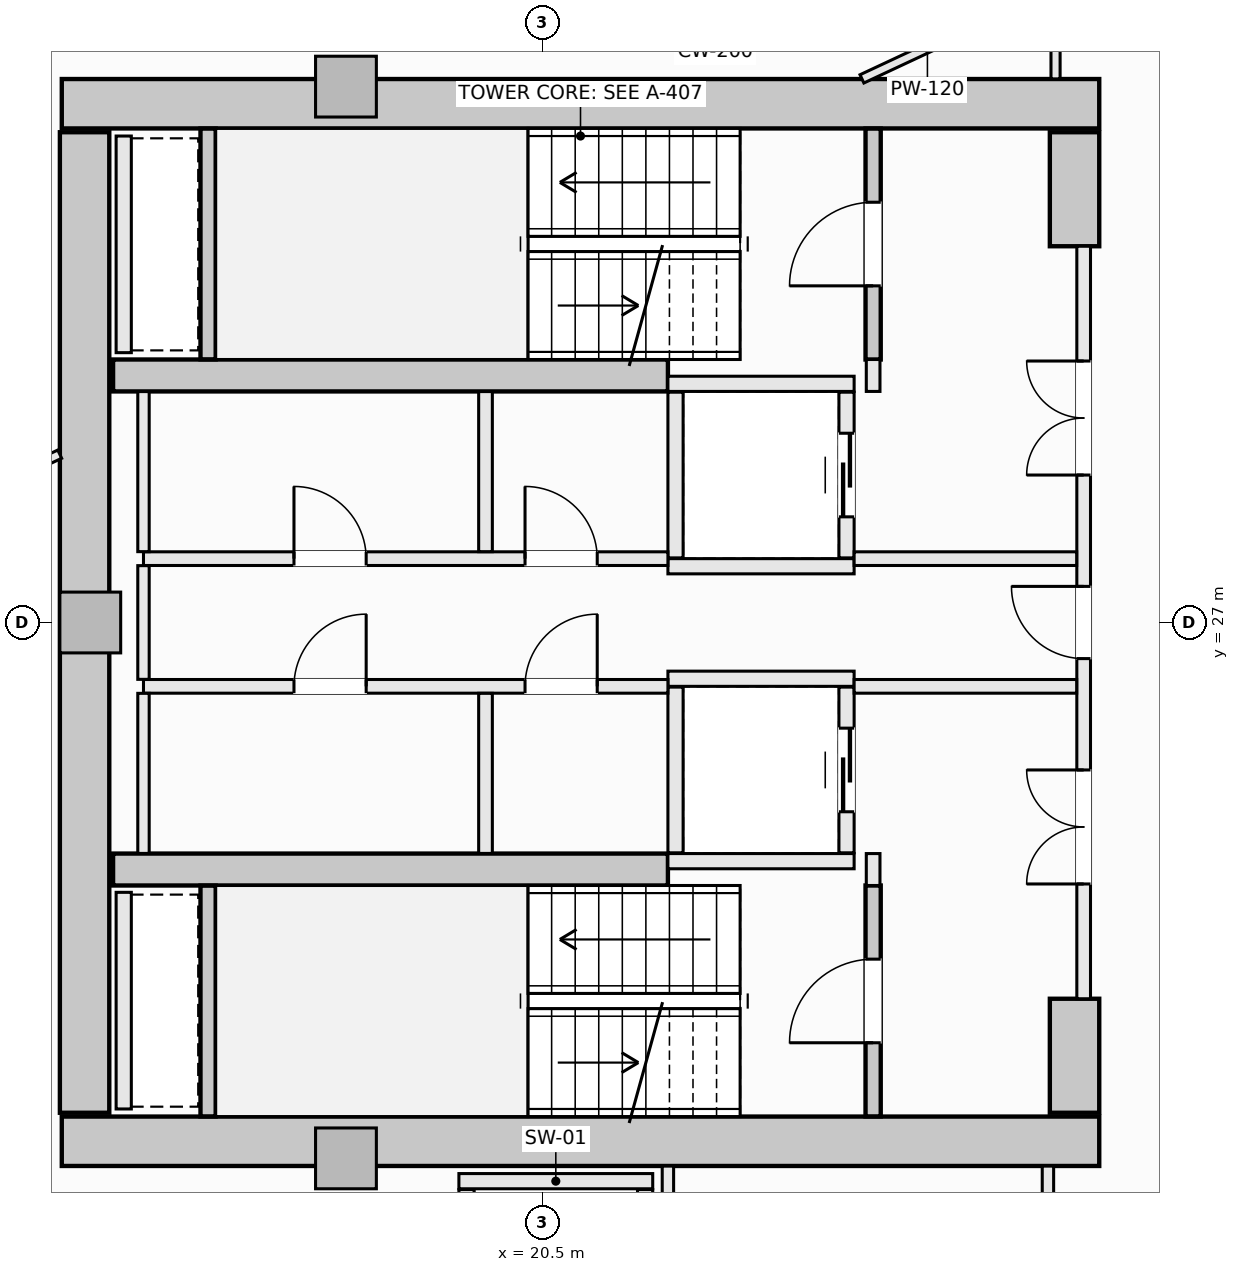
"""IFC4 building model, lengths in metres.
Left out: names, types, materials, properties, quantities, classifications, styles, units other than length and angle.
Written with IfcOpenShell. Run it as: python <this file> out.ifc"""

import sys

from ifc_helpers import new_model, si_unit, direction, frame, frame_2d, origin, origin_2d, place, context, subcontext, project, spatial, rectangle, extrude, element, fill, save


model = new_model("IFC4")
c1 = context("Model", 3, precision=1e-05, world=origin(), true_north=direction((0.0, 1.0)))
c2 = subcontext(c1, "Body", "Model", "MODEL_VIEW")
j1 = project(units=[si_unit("LENGTHUNIT", "METRE"), si_unit("PLANEANGLEUNIT", "RADIAN")], contexts=[c1])
p1 = place(None, origin())
s1 = spatial("IfcSite", under=j1, at=p1, CompositionType="ELEMENT")
p2 = place(p1, origin())
s2 = spatial("IfcBuilding", under=s1, at=p2, CompositionType="ELEMENT")
p3 = place(p2, frame((0.0, 0.0, 118.9)))
s3 = spatial("IfcBuildingStorey", under=s2, at=p3, CompositionType="ELEMENT", Elevation=118.9)
for number, where, z_axis, x_axis in (
    (1, (14.175, 33.825, -0.27), (0.0, 0.0, 1.0), (1.0, 0.0, 0.0)),
    (2, (14.175, 20.175, -0.27), (0.0, 0.0, 1.0), (1.0, 0.0, 0.0)),
):
    element("IfcWall", number, at=place(p3, frame(where, z_axis=z_axis, x_axis=x_axis)), inside=s3, PredefinedType="SHEAR", context=c2, shape_type="SweptSolid", body=[
        extrude(rectangle(XDim=13.65, YDim=0.65, at=frame_2d((6.825, 0.0))), origin(), (0.0, 0.0, 1.0), 3.4),
    ])
p4 = place(p3, frame((14.475, 20.55, -0.27), z_axis=(0.0, 0.0, 1.0), x_axis=(0.0, 1.0, 0.0)))
e3 = element("IfcWall", 3, at=p4, inside=s3, PredefinedType="SHEAR", context=c2, shape_type="SweptSolid", body=[
    extrude(rectangle(XDim=12.9, YDim=0.65, at=frame_2d((6.45, 0.0))), origin(), (0.0, 0.0, 1.0), 3.4),
])
for number, where, z_axis, x_axis in (
    (4, (27.5, 31.95, -0.27), (0.0, 0.0, 1.0), (0.0, 1.0, 0.0)),
    (5, (27.5, 20.55, -0.27), (0.0, 0.0, 1.0), (0.0, 1.0, 0.0)),
):
    element("IfcWall", number, at=place(p3, frame(where, z_axis=z_axis, x_axis=x_axis)), inside=s3, PredefinedType="SHEAR", context=c2, shape_type="SweptSolid", body=[
        extrude(rectangle(XDim=1.5, YDim=0.65, at=frame_2d((0.75, 0.0))), origin(), (0.0, 0.0, 1.0), 3.4),
    ])
for number, where, z_axis, x_axis in (
    (6, (14.85, 30.25, -0.27), (0.0, 0.0, 1.0), (1.0, 0.0, 0.0)),
    (7, (14.85, 23.75, -0.27), (0.0, 0.0, 1.0), (1.0, 0.0, 0.0)),
):
    element("IfcWall", number, at=place(p3, frame(where, z_axis=z_axis, x_axis=x_axis)), inside=s3, PredefinedType="SHEAR", context=c2, shape_type="SweptSolid", body=[
        extrude(rectangle(XDim=7.3, YDim=0.42, at=frame_2d((3.65, 0.0))), origin(), (0.0, 0.0, 1.0), 3.4),
    ])
for number, where, z_axis, x_axis in (
    (8, (17.914, 34.05, -0.27), (0.0, 0.0, 1.0), (1.0, 0.0, 0.0)),
    (9, (14.55, 27.0, -0.27), (0.0, 0.0, 1.0), (1.0, 0.0, 0.0)),
    (10, (17.914, 19.95, -0.27), (0.0, 0.0, 1.0), (1.0, 0.0, 0.0)),
):
    element("IfcColumn", number, at=place(p3, frame(where, z_axis=z_axis, x_axis=x_axis)), inside=s3, PredefinedType="PILASTER", context=c2, shape_type="SweptSolid", body=[
        extrude(rectangle(XDim=0.8, YDim=0.8, at=origin_2d()), origin(), (0.0, 0.0, 1.0), 3.4),
    ])
p5 = place(p3, frame((24.85, 30.46, -0.27), z_axis=(0.0, 0.0, 1.0), x_axis=(0.0, 1.0, 0.0)))
e11 = element("IfcWall", 11, at=p5, inside=s3, PredefinedType="SHEAR", context=c2, shape_type="SweptSolid", body=[
    extrude(rectangle(XDim=3.038, YDim=0.2, at=frame_2d((1.519, 0.0))), origin(), (0.0, 0.0, 1.0), 3.4),
])
p6 = place(p5, frame((0.969, 0.0, 0.27)))
e12 = element("IfcOpeningElement", 12, at=p6, cuts=e11, PredefinedType="OPENING", context=c2, shape_type="SweptSolid", body=[
    extrude(rectangle(XDim=1.1, YDim=2.15, at=frame_2d((0.55, 1.075))), frame((0.0, 0.11, 0.0), z_axis=(0.0, -1.0, 0.0), x_axis=(1.0, 0.0, 0.0)), (0.0, 0.0, 1.0), 0.22),
])
p7 = place(p3, frame((16.1, 30.462, -0.27), z_axis=(0.0, 0.0, 1.0), x_axis=(0.0, 1.0, 0.0)))
e13 = element("IfcWall", 13, at=p7, inside=s3, PredefinedType="SHEAR", context=c2, shape_type="SweptSolid", body=[
    extrude(rectangle(XDim=3.036, YDim=0.2, at=frame_2d((1.518, 0.0))), origin(), (0.0, 0.0, 1.0), 3.4),
])
p8 = place(p3, frame((24.85, 20.502, -0.27), z_axis=(0.0, 0.0, 1.0), x_axis=(0.0, 1.0, 0.0)))
e14 = element("IfcWall", 14, at=p8, inside=s3, PredefinedType="SHEAR", context=c2, shape_type="SweptSolid", body=[
    extrude(rectangle(XDim=3.038, YDim=0.2, at=frame_2d((1.519, 0.0))), origin(), (0.0, 0.0, 1.0), 3.4),
])
p9 = place(p8, frame((0.969, 0.0, 0.27)))
e15 = element("IfcOpeningElement", 15, at=p9, cuts=e14, PredefinedType="OPENING", context=c2, shape_type="SweptSolid", body=[
    extrude(rectangle(XDim=1.1, YDim=2.15, at=frame_2d((0.55, 1.075))), frame((0.0, 0.11, 0.0), z_axis=(0.0, -1.0, 0.0), x_axis=(1.0, 0.0, 0.0)), (0.0, 0.0, 1.0), 0.22),
])
p10 = place(p3, frame((16.1, 20.502, -0.27), z_axis=(0.0, 0.0, 1.0), x_axis=(0.0, 1.0, 0.0)))
e16 = element("IfcWall", 16, at=p10, inside=s3, PredefinedType="SHEAR", context=c2, shape_type="SweptSolid", body=[
    extrude(rectangle(XDim=3.036, YDim=0.2, at=frame_2d((1.518, 0.0))), origin(), (0.0, 0.0, 1.0), 3.4),
])
for number, where, z_axis, x_axis in (
    (17, (22.15, 30.14, 0.0), (0.0, 0.0, 1.0), (1.0, 0.0, 0.0)),
    (18, (22.15, 27.74, 0.0), (0.0, 0.0, 1.0), (1.0, 0.0, 0.0)),
):
    element("IfcWall", number, at=place(p3, frame(where, z_axis=z_axis, x_axis=x_axis)), inside=s3, PredefinedType="SOLIDWALL", context=c2, shape_type="SweptSolid", body=[
        extrude(rectangle(XDim=2.45, YDim=0.2, at=frame_2d((1.225, 0.0))), origin(), (0.0, 0.0, 1.0), 3.13),
    ])
p11 = place(p3, frame((22.25, 27.85, 0.0), z_axis=(0.0, 0.0, 1.0), x_axis=(0.0, 1.0, 0.0)))
e19 = element("IfcWall", 19, at=p11, inside=s3, PredefinedType="SOLIDWALL", context=c2, shape_type="SweptSolid", body=[
    extrude(rectangle(XDim=2.18, YDim=0.2, at=frame_2d((1.09, 0.0))), origin(), (0.0, 0.0, 1.0), 3.13),
])
p12 = place(p3, frame((24.5, 27.85, 0.0), z_axis=(0.0, 0.0, 1.0), x_axis=(0.0, 1.0, 0.0)))
e20 = element("IfcWall", 20, at=p12, inside=s3, PredefinedType="SOLIDWALL", context=c2, shape_type="SweptSolid", body=[
    extrude(rectangle(XDim=2.18, YDim=0.2, at=frame_2d((1.09, 0.0))), origin(), (0.0, 0.0, 1.0), 3.13),
])
p13 = place(p12, frame((0.54, 0.0, 0.0)))
e21 = element("IfcOpeningElement", 21, at=p13, cuts=e20, PredefinedType="OPENING", context=c2, shape_type="SweptSolid", body=[
    extrude(rectangle(XDim=1.1, YDim=2.2, at=frame_2d((0.55, 1.1))), frame((0.0, 0.11, 0.0), z_axis=(0.0, -1.0, 0.0), x_axis=(1.0, 0.0, 0.0)), (0.0, 0.0, 1.0), 0.22),
])
for number, where, z_axis, x_axis in (
    (22, (22.15, 26.26, 0.0), (0.0, 0.0, 1.0), (1.0, 0.0, 0.0)),
    (23, (22.15, 23.86, 0.0), (0.0, 0.0, 1.0), (1.0, 0.0, 0.0)),
):
    element("IfcWall", number, at=place(p3, frame(where, z_axis=z_axis, x_axis=x_axis)), inside=s3, PredefinedType="SOLIDWALL", context=c2, shape_type="SweptSolid", body=[
        extrude(rectangle(XDim=2.45, YDim=0.2, at=frame_2d((1.225, 0.0))), origin(), (0.0, 0.0, 1.0), 3.13),
    ])
p14 = place(p3, frame((22.25, 23.97, 0.0), z_axis=(0.0, 0.0, 1.0), x_axis=(0.0, 1.0, 0.0)))
e24 = element("IfcWall", 24, at=p14, inside=s3, PredefinedType="SOLIDWALL", context=c2, shape_type="SweptSolid", body=[
    extrude(rectangle(XDim=2.18, YDim=0.2, at=frame_2d((1.09, 0.0))), origin(), (0.0, 0.0, 1.0), 3.13),
])
p15 = place(p3, frame((24.5, 23.97, 0.0), z_axis=(0.0, 0.0, 1.0), x_axis=(0.0, 1.0, 0.0)))
e25 = element("IfcWall", 25, at=p15, inside=s3, PredefinedType="SOLIDWALL", context=c2, shape_type="SweptSolid", body=[
    extrude(rectangle(XDim=2.18, YDim=0.2, at=frame_2d((1.09, 0.0))), origin(), (0.0, 0.0, 1.0), 3.13),
])
p16 = place(p15, frame((0.54, 0.0, 0.0)))
e26 = element("IfcOpeningElement", 26, at=p16, cuts=e25, PredefinedType="OPENING", context=c2, shape_type="SweptSolid", body=[
    extrude(rectangle(XDim=1.1, YDim=2.2, at=frame_2d((0.55, 1.1))), frame((0.0, 0.11, 0.0), z_axis=(0.0, -1.0, 0.0), x_axis=(1.0, 0.0, 0.0)), (0.0, 0.0, 1.0), 0.22),
])
p17 = place(p3, frame((19.4, 19.65, 0.0), z_axis=(0.0, 0.0, 1.0), x_axis=(1.0, 0.0, 0.0)))
e27 = element("IfcWall", 27, at=p17, inside=s3, PredefinedType="SOLIDWALL", context=c2, shape_type="SweptSolid", body=[
    extrude(rectangle(XDim=2.55, YDim=0.2, at=frame_2d((1.275, 0.0))), origin(), (0.0, 0.0, 1.0), 3.13),
])
for number, where, z_axis, x_axis in (
    (28, (19.5, 17.01, 0.0), (0.0, 0.0, 1.0), (0.0, 1.0, 0.0)),
    (29, (21.85, 17.01, 0.0), (0.0, 0.0, 1.0), (0.0, 1.0, 0.0)),
):
    element("IfcWall", number, at=place(p3, frame(where, z_axis=z_axis, x_axis=x_axis)), inside=s3, PredefinedType="SOLIDWALL", context=c2, shape_type="SweptSolid", body=[
        extrude(rectangle(XDim=2.53, YDim=0.2, at=frame_2d((1.265, 0.0))), origin(), (0.0, 0.0, 1.0), 3.13),
    ])
for number, where, z_axis, x_axis in (
    (30, (14.99, 30.55, 0.0), (0.0, 0.0, 1.0), (0.0, 1.0, 0.0)),
    (31, (14.99, 20.6, 0.0), (0.0, 0.0, 1.0), (0.0, 1.0, 0.0)),
):
    element("IfcWall", number, at=place(p3, frame(where, z_axis=z_axis, x_axis=x_axis)), inside=s3, PredefinedType="SOLIDWALL", context=c2, shape_type="SweptSolid", body=[
        extrude(rectangle(XDim=2.85, YDim=0.2, at=frame_2d((1.425, 0.0))), origin(), (0.0, 0.0, 1.0), 3.13),
    ])
for number, where, z_axis, x_axis in (
    (32, (24.85, 23.54, 0.0), (0.0, 0.0, 1.0), (0.0, 1.0, 0.0)),
    (33, (24.85, 30.04, 0.0), (0.0, 0.0, 1.0), (0.0, 1.0, 0.0)),
):
    element("IfcWall", number, at=place(p3, frame(where, z_axis=z_axis, x_axis=x_axis)), inside=s3, PredefinedType="SOLIDWALL", context=c2, shape_type="SweptSolid", body=[
        extrude(rectangle(XDim=0.42, YDim=0.18, at=frame_2d((0.21, 0.0))), origin(), (0.0, 0.0, 1.0), 3.13),
    ])
p18 = place(p3, frame((27.62, 22.05, 0.0), z_axis=(0.0, 0.0, 1.0), x_axis=(0.0, 1.0, 0.0)))
e34 = element("IfcWall", 34, at=p18, inside=s3, PredefinedType="SOLIDWALL", context=c2, shape_type="SweptSolid", body=[
    extrude(rectangle(XDim=9.9, YDim=0.18, at=frame_2d((4.95, 0.0))), origin(), (0.0, 0.0, 1.0), 3.13),
])
p19 = place(p18, frame((4.475, 0.0, 0.0)))
e35 = element("IfcOpeningElement", 35, at=p19, cuts=e34, PredefinedType="OPENING", context=c2, shape_type="SweptSolid", body=[
    extrude(rectangle(XDim=0.95, YDim=2.1, at=frame_2d((0.475, 1.05))), frame((0.0, 0.1, 0.0), z_axis=(0.0, -1.0, 0.0), x_axis=(1.0, 0.0, 0.0)), (0.0, 0.0, 1.0), 0.2),
])
p20 = place(p18, frame((6.89, 0.0, 0.0)))
e36 = element("IfcOpeningElement", 36, at=p20, cuts=e34, PredefinedType="OPENING", context=c2, shape_type="SweptSolid", body=[
    extrude(rectangle(XDim=1.5, YDim=2.2, at=frame_2d((0.75, 1.1))), frame((0.0, 0.1, 0.0), z_axis=(0.0, -1.0, 0.0), x_axis=(1.0, 0.0, 0.0)), (0.0, 0.0, 1.0), 0.2),
])
p21 = place(p18, frame((1.51, 0.0, 0.0)))
e37 = element("IfcOpeningElement", 37, at=p21, cuts=e34, PredefinedType="OPENING", context=c2, shape_type="SweptSolid", body=[
    extrude(rectangle(XDim=1.5, YDim=2.2, at=frame_2d((0.75, 1.1))), frame((0.0, 0.1, 0.0), z_axis=(0.0, -1.0, 0.0), x_axis=(1.0, 0.0, 0.0)), (0.0, 0.0, 1.0), 0.2),
])
p22 = place(p3, frame((15.25, 27.84, 0.0), z_axis=(0.0, 0.0, 1.0), x_axis=(1.0, 0.0, 0.0)))
e38 = element("IfcWall", 38, at=p22, inside=s3, PredefinedType="SOLIDWALL", context=c2, shape_type="SweptSolid", body=[
    extrude(rectangle(XDim=6.9, YDim=0.18, at=frame_2d((3.45, 0.0))), origin(), (0.0, 0.0, 1.0), 3.13),
])
p23 = place(p22, frame((5.02, 0.0, 0.0)))
e39 = element("IfcOpeningElement", 39, at=p23, cuts=e38, PredefinedType="OPENING", context=c2, shape_type="SweptSolid", body=[
    extrude(rectangle(XDim=0.95, YDim=2.1, at=frame_2d((0.475, 1.05))), frame((0.0, 0.1, 0.0), z_axis=(0.0, -1.0, 0.0), x_axis=(1.0, 0.0, 0.0)), (0.0, 0.0, 1.0), 0.2),
])
p24 = place(p22, frame((1.98, 0.0, 0.0)))
e40 = element("IfcOpeningElement", 40, at=p24, cuts=e38, PredefinedType="OPENING", context=c2, shape_type="SweptSolid", body=[
    extrude(rectangle(XDim=0.95, YDim=2.1, at=frame_2d((0.475, 1.05))), frame((0.0, 0.1, 0.0), z_axis=(0.0, -1.0, 0.0), x_axis=(1.0, 0.0, 0.0)), (0.0, 0.0, 1.0), 0.2),
])
p25 = place(p3, frame((24.6, 27.84, 0.0), z_axis=(0.0, 0.0, 1.0), x_axis=(1.0, 0.0, 0.0)))
e41 = element("IfcWall", 41, at=p25, inside=s3, PredefinedType="SOLIDWALL", context=c2, shape_type="SweptSolid", body=[
    extrude(rectangle(XDim=2.928, YDim=0.18, at=frame_2d((1.464, 0.0))), origin(), (0.0, 0.0, 1.0), 3.13),
])
p26 = place(p3, frame((15.25, 26.16, 0.0), z_axis=(0.0, 0.0, 1.0), x_axis=(1.0, 0.0, 0.0)))
e42 = element("IfcWall", 42, at=p26, inside=s3, PredefinedType="SOLIDWALL", context=c2, shape_type="SweptSolid", body=[
    extrude(rectangle(XDim=6.9, YDim=0.18, at=frame_2d((3.45, 0.0))), origin(), (0.0, 0.0, 1.0), 3.13),
])
p27 = place(p26, frame((5.02, 0.0, 0.0)))
e43 = element("IfcOpeningElement", 43, at=p27, cuts=e42, PredefinedType="OPENING", context=c2, shape_type="SweptSolid", body=[
    extrude(rectangle(XDim=0.95, YDim=2.1, at=frame_2d((0.475, 1.05))), frame((0.0, 0.1, 0.0), z_axis=(0.0, -1.0, 0.0), x_axis=(1.0, 0.0, 0.0)), (0.0, 0.0, 1.0), 0.2),
])
p28 = place(p26, frame((1.98, 0.0, 0.0)))
e44 = element("IfcOpeningElement", 44, at=p28, cuts=e42, PredefinedType="OPENING", context=c2, shape_type="SweptSolid", body=[
    extrude(rectangle(XDim=0.95, YDim=2.1, at=frame_2d((0.475, 1.05))), frame((0.0, 0.1, 0.0), z_axis=(0.0, -1.0, 0.0), x_axis=(1.0, 0.0, 0.0)), (0.0, 0.0, 1.0), 0.2),
])
p29 = place(p3, frame((24.6, 26.16, 0.0), z_axis=(0.0, 0.0, 1.0), x_axis=(1.0, 0.0, 0.0)))
e45 = element("IfcWall", 45, at=p29, inside=s3, PredefinedType="SOLIDWALL", context=c2, shape_type="SweptSolid", body=[
    extrude(rectangle(XDim=2.928, YDim=0.18, at=frame_2d((1.464, 0.0))), origin(), (0.0, 0.0, 1.0), 3.13),
])
p30 = place(p3, frame((15.25, 23.962, 0.0), z_axis=(0.0, 0.0, 1.0), x_axis=(0.0, 1.0, 0.0)))
e46 = element("IfcWall", 46, at=p30, inside=s3, PredefinedType="PARTITIONING", context=c2, shape_type="SweptSolid", body=[
    extrude(rectangle(XDim=2.106, YDim=0.15, at=frame_2d((1.053, 0.0))), origin(), (0.0, 0.0, 1.0), 3.13),
])
p31 = place(p3, frame((15.25, 26.252, 0.0), z_axis=(0.0, 0.0, 1.0), x_axis=(0.0, 1.0, 0.0)))
e47 = element("IfcWall", 47, at=p31, inside=s3, PredefinedType="PARTITIONING", context=c2, shape_type="SweptSolid", body=[
    extrude(rectangle(XDim=1.496, YDim=0.15, at=frame_2d((0.748, 0.0))), origin(), (0.0, 0.0, 1.0), 3.13),
])
p32 = place(p3, frame((15.25, 27.932, 0.0), z_axis=(0.0, 0.0, 1.0), x_axis=(0.0, 1.0, 0.0)))
e48 = element("IfcWall", 48, at=p32, inside=s3, PredefinedType="PARTITIONING", context=c2, shape_type="SweptSolid", body=[
    extrude(rectangle(XDim=2.106, YDim=0.15, at=frame_2d((1.053, 0.0))), origin(), (0.0, 0.0, 1.0), 3.13),
])
for number, where, z_axis, x_axis in (
    (49, (19.75, 23.962, 0.0), (0.0, 0.0, 1.0), (0.0, 1.0, 0.0)),
    (50, (19.75, 27.932, 0.0), (0.0, 0.0, 1.0), (0.0, 1.0, 0.0)),
):
    element("IfcWall", number, at=place(p3, frame(where, z_axis=z_axis, x_axis=x_axis)), inside=s3, PredefinedType="SOLIDWALL", context=c2, shape_type="SweptSolid", body=[
        extrude(rectangle(XDim=2.106, YDim=0.18, at=frame_2d((1.053, 0.0))), origin(), (0.0, 0.0, 1.0), 3.13),
    ])
for number, where, z_axis, x_axis in (
    (51, (22.15, 17.127, 0.0), (0.0, 0.0, 1.0), (0.0, 1.0, 0.0)),
    (52, (27.15, 17.127, 0.0), (0.0, 0.0, 1.0), (0.0, 1.0, 0.0)),
):
    element("IfcWall", number, at=place(p3, frame(where, z_axis=z_axis, x_axis=x_axis)), inside=s3, PredefinedType="PARTITIONING", context=c2, shape_type="SweptSolid", body=[
        extrude(rectangle(XDim=2.721, YDim=0.15, at=frame_2d((1.36, 0.0))), origin(), (0.0, 0.0, 1.0), 3.13),
    ])
p33 = place(p3, frame((27.25, 34.152, 0.0), z_axis=(0.0, 0.0, 1.0), x_axis=(0.0, 1.0, 0.0)))
e53 = element("IfcWall", 53, at=p33, inside=s3, PredefinedType="PARTITIONING", context=c2, shape_type="SweptSolid", body=[
    extrude(rectangle(XDim=0.806, YDim=0.12, at=frame_2d((0.403, 0.0))), origin(), (0.0, 0.0, 1.0), 3.13),
])
p34 = place(p3, frame((6.329, 25.557, 0.0), z_axis=(0.0, 0.0, 1.0), x_axis=(0.905786782764, 0.423733765671, 0.0)))
e54 = element("IfcWall", 54, at=p34, inside=s3, PredefinedType="PARTITIONING", context=c2, shape_type="SweptSolid", body=[
    extrude(rectangle(XDim=8.632, YDim=0.12, at=frame_2d((4.316, 0.0))), origin(), (0.0, 0.0, 1.0), 2.505),
])
p35 = place(p3, frame((24.703, 34.152, 0.0), z_axis=(0.0, 0.0, 1.0), x_axis=(0.90580239241, 0.423700396393, 0.0)))
e55 = element("IfcWall", 55, at=p35, inside=s3, PredefinedType="PARTITIONING", context=c2, shape_type="SweptSolid", body=[
    extrude(rectangle(XDim=1.902, YDim=0.12, at=frame_2d((0.951, 0.0))), origin(), (0.0, 0.0, 1.0), 3.13),
])
p36 = place(p6, origin())
e56 = element("IfcDoor", 56, at=p36, inside=s3, OperationType="SINGLE_SWING_LEFT", PredefinedType="DOOR", context=c2, shape_type="SweptSolid", body=[
    extrude(rectangle(XDim=1.1, YDim=2.15, at=frame_2d((0.55, 1.075))), frame((0.0, 0.025, 0.0), z_axis=(0.0, -1.0, 0.0), x_axis=(1.0, 0.0, 0.0)), (0.0, 0.0, 1.0), 0.05),
])
fill(e12, e56)
p37 = place(p9, origin())
e57 = element("IfcDoor", 57, at=p37, inside=s3, OperationType="SINGLE_SWING_LEFT", PredefinedType="DOOR", context=c2, shape_type="SweptSolid", body=[
    extrude(rectangle(XDim=1.1, YDim=2.15, at=frame_2d((0.55, 1.075))), frame((0.0, 0.025, 0.0), z_axis=(0.0, -1.0, 0.0), x_axis=(1.0, 0.0, 0.0)), (0.0, 0.0, 1.0), 0.05),
])
fill(e15, e57)
p38 = place(p13, origin())
e58 = element("IfcDoor", 58, at=p38, inside=s3, OperationType="SLIDING_TO_LEFT", PredefinedType="DOOR", context=c2, shape_type="SweptSolid", body=[
    extrude(rectangle(XDim=1.1, YDim=2.2, at=frame_2d((0.55, 1.1))), frame((0.0, 0.025, 0.0), z_axis=(0.0, -1.0, 0.0), x_axis=(1.0, 0.0, 0.0)), (0.0, 0.0, 1.0), 0.05),
])
fill(e21, e58)
p39 = place(p16, origin())
e59 = element("IfcDoor", 59, at=p39, inside=s3, OperationType="SLIDING_TO_LEFT", PredefinedType="DOOR", context=c2, shape_type="SweptSolid", body=[
    extrude(rectangle(XDim=1.1, YDim=2.2, at=frame_2d((0.55, 1.1))), frame((0.0, 0.025, 0.0), z_axis=(0.0, -1.0, 0.0), x_axis=(1.0, 0.0, 0.0)), (0.0, 0.0, 1.0), 0.05),
])
fill(e26, e59)
p40 = place(p19, origin())
e60 = element("IfcDoor", 60, at=p40, inside=s3, OperationType="SINGLE_SWING_RIGHT", PredefinedType="DOOR", context=c2, shape_type="SweptSolid", body=[
    extrude(rectangle(XDim=0.95, YDim=2.1, at=frame_2d((0.475, 1.05))), frame((0.0, 0.025, 0.0), z_axis=(0.0, -1.0, 0.0), x_axis=(1.0, 0.0, 0.0)), (0.0, 0.0, 1.0), 0.05),
])
fill(e35, e60)
p41 = place(p20, origin())
e61 = element("IfcDoor", 61, at=p41, inside=s3, OperationType="DOUBLE_DOOR_SINGLE_SWING", PredefinedType="DOOR", context=c2, shape_type="SweptSolid", body=[
    extrude(rectangle(XDim=1.5, YDim=2.2, at=frame_2d((0.75, 1.1))), frame((0.0, 0.025, 0.0), z_axis=(0.0, -1.0, 0.0), x_axis=(1.0, 0.0, 0.0)), (0.0, 0.0, 1.0), 0.05),
])
fill(e36, e61)
p42 = place(p21, origin())
e62 = element("IfcDoor", 62, at=p42, inside=s3, OperationType="DOUBLE_DOOR_SINGLE_SWING", PredefinedType="DOOR", context=c2, shape_type="SweptSolid", body=[
    extrude(rectangle(XDim=1.5, YDim=2.2, at=frame_2d((0.75, 1.1))), frame((0.0, 0.025, 0.0), z_axis=(0.0, -1.0, 0.0), x_axis=(1.0, 0.0, 0.0)), (0.0, 0.0, 1.0), 0.05),
])
fill(e37, e62)
p43 = place(p23, origin())
e63 = element("IfcDoor", 63, at=p43, inside=s3, OperationType="SINGLE_SWING_LEFT", PredefinedType="DOOR", context=c2, shape_type="SweptSolid", body=[
    extrude(rectangle(XDim=0.95, YDim=2.1, at=frame_2d((0.475, 1.05))), frame((0.0, 0.025, 0.0), z_axis=(0.0, -1.0, 0.0), x_axis=(1.0, 0.0, 0.0)), (0.0, 0.0, 1.0), 0.05),
])
fill(e39, e63)
p44 = place(p27, origin())
e64 = element("IfcDoor", 64, at=p44, inside=s3, OperationType="SINGLE_SWING_RIGHT", PredefinedType="DOOR", context=c2, shape_type="SweptSolid", body=[
    extrude(rectangle(XDim=0.95, YDim=2.1, at=frame_2d((0.475, 1.05))), frame((0.0, 0.025, 0.0), z_axis=(0.0, -1.0, 0.0), x_axis=(1.0, 0.0, 0.0)), (0.0, 0.0, 1.0), 0.05),
])
fill(e43, e64)
p45 = place(p24, origin())
e65 = element("IfcDoor", 65, at=p45, inside=s3, OperationType="SINGLE_SWING_LEFT", PredefinedType="DOOR", context=c2, shape_type="SweptSolid", body=[
    extrude(rectangle(XDim=0.95, YDim=2.1, at=frame_2d((0.475, 1.05))), frame((0.0, 0.025, 0.0), z_axis=(0.0, -1.0, 0.0), x_axis=(1.0, 0.0, 0.0)), (0.0, 0.0, 1.0), 0.05),
])
fill(e40, e65)
p46 = place(p28, origin())
e66 = element("IfcDoor", 66, at=p46, inside=s3, OperationType="SINGLE_SWING_RIGHT", PredefinedType="DOOR", context=c2, shape_type="SweptSolid", body=[
    extrude(rectangle(XDim=0.95, YDim=2.1, at=frame_2d((0.475, 1.05))), frame((0.0, 0.025, 0.0), z_axis=(0.0, -1.0, 0.0), x_axis=(1.0, 0.0, 0.0)), (0.0, 0.0, 1.0), 0.05),
])
fill(e44, e66)
save(model, sys.argv[1])
